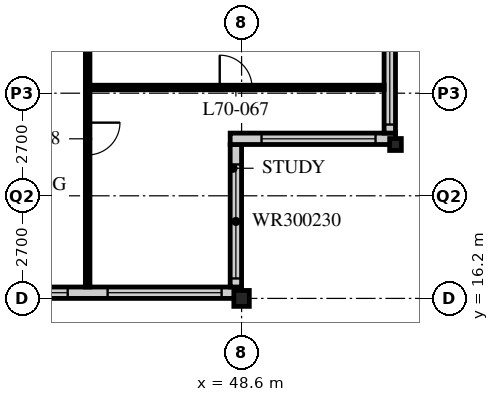
"""IFC4 building model, lengths in metres.
Left out: names, types, materials, properties, quantities, classifications, styles, units other than length and angle.
Written with IfcOpenShell. Run it as: python <this file> out.ifc"""

import sys

from ifc_helpers import new_model, si_unit, direction, frame, frame_2d, origin, origin_2d, place, context, subcontext, project, spatial, rectangle, i_section, extrude, element, fill, save


model = new_model("IFC4")
c1 = context("Model", 3, precision=1e-05, world=origin(), true_north=direction((0.0, 1.0)))
c2 = subcontext(c1, "Body", "Model", "MODEL_VIEW")
j1 = project(units=[si_unit("LENGTHUNIT", "METRE"), si_unit("PLANEANGLEUNIT", "RADIAN")], contexts=[c1])
p1 = place(None, origin())
s1 = spatial("IfcSite", under=j1, at=p1, CompositionType="ELEMENT")
p2 = place(p1, origin())
s2 = spatial("IfcBuilding", under=s1, at=p2, CompositionType="ELEMENT")
p3 = place(p2, frame((0.0, 0.0, 273.6)))
s3 = spatial("IfcBuildingStorey", under=s2, at=p3, CompositionType="ELEMENT", Elevation=273.6)
p4 = place(p3, frame((48.6, 16.2, 0.0), z_axis=(0.0, 0.0, 1.0), x_axis=(1.0, 0.0, 0.0)))
e1 = element("IfcColumn", 1, at=p4, inside=s3, PredefinedType="COLUMN", context=c2, shape_type="SweptSolid", body=[
    extrude(i_section(OverallWidth=0.407, OverallDepth=0.419, WebThickness=0.031, FlangeThickness=0.049, FilletRadius=0.015, at=origin_2d()), origin(), (0.0, 0.0, 1.0), 3.9),
])
p5 = place(p3, frame((52.65, 20.25, 0.0), z_axis=(0.0, 0.0, 1.0), x_axis=(1.0, 0.0, 0.0)))
e2 = element("IfcColumn", 2, at=p5, inside=s3, PredefinedType="COLUMN", context=c2, shape_type="SweptSolid", body=[
    extrude(i_section(OverallWidth=0.307, OverallDepth=0.314, WebThickness=0.012, FlangeThickness=0.019, FilletRadius=0.015, at=origin_2d()), origin(), (0.0, 0.0, 1.0), 3.9),
])
p6 = place(p3, frame((8.4, 16.35, 0.0), z_axis=(0.0, 0.0, 1.0), x_axis=(1.0, 0.0, 0.0)))
e3 = element("IfcWall", 3, at=p6, inside=s3, PredefinedType="SOLIDWALL", context=c2, shape_type="SweptSolid", body=[
    extrude(rectangle(XDim=40.2, YDim=0.3, at=frame_2d((20.1, 0.0))), origin(), (0.0, 0.0, 1.0), 3.69),
])
p7 = place(p6, frame((0.225, 0.0, 0.6)))
e4 = element("IfcOpeningElement", 4, at=p7, cuts=e3, PredefinedType="OPENING", context=c2, shape_type="SweptSolid", body=[
    extrude(rectangle(XDim=3.0, YDim=2.4, at=frame_2d((1.5, 1.2))), frame((0.0, 0.16, 0.0), z_axis=(0.0, -1.0, 0.0), x_axis=(1.0, 0.0, 0.0)), (0.0, 0.0, 1.0), 0.32),
])
p8 = place(p6, frame((4.275, 0.0, 0.6)))
e5 = element("IfcOpeningElement", 5, at=p8, cuts=e3, PredefinedType="OPENING", context=c2, shape_type="SweptSolid", body=[
    extrude(rectangle(XDim=3.0, YDim=2.4, at=frame_2d((1.5, 1.2))), frame((0.0, 0.16, 0.0), z_axis=(0.0, -1.0, 0.0), x_axis=(1.0, 0.0, 0.0)), (0.0, 0.0, 1.0), 0.32),
])
p9 = place(p6, frame((8.325, 0.0, 0.6)))
e6 = element("IfcOpeningElement", 6, at=p9, cuts=e3, PredefinedType="OPENING", context=c2, shape_type="SweptSolid", body=[
    extrude(rectangle(XDim=3.0, YDim=2.4, at=frame_2d((1.5, 1.2))), frame((0.0, 0.16, 0.0), z_axis=(0.0, -1.0, 0.0), x_axis=(1.0, 0.0, 0.0)), (0.0, 0.0, 1.0), 0.32),
])
p10 = place(p6, frame((12.375, 0.0, 0.6)))
e7 = element("IfcOpeningElement", 7, at=p10, cuts=e3, PredefinedType="OPENING", context=c2, shape_type="SweptSolid", body=[
    extrude(rectangle(XDim=3.0, YDim=2.4, at=frame_2d((1.5, 1.2))), frame((0.0, 0.16, 0.0), z_axis=(0.0, -1.0, 0.0), x_axis=(1.0, 0.0, 0.0)), (0.0, 0.0, 1.0), 0.32),
])
p11 = place(p6, frame((16.425, 0.0, 0.6)))
e8 = element("IfcOpeningElement", 8, at=p11, cuts=e3, PredefinedType="OPENING", context=c2, shape_type="SweptSolid", body=[
    extrude(rectangle(XDim=3.0, YDim=2.4, at=frame_2d((1.5, 1.2))), frame((0.0, 0.16, 0.0), z_axis=(0.0, -1.0, 0.0), x_axis=(1.0, 0.0, 0.0)), (0.0, 0.0, 1.0), 0.32),
])
p12 = place(p6, frame((20.475, 0.0, 0.6)))
e9 = element("IfcOpeningElement", 9, at=p12, cuts=e3, PredefinedType="OPENING", context=c2, shape_type="SweptSolid", body=[
    extrude(rectangle(XDim=3.0, YDim=2.4, at=frame_2d((1.5, 1.2))), frame((0.0, 0.16, 0.0), z_axis=(0.0, -1.0, 0.0), x_axis=(1.0, 0.0, 0.0)), (0.0, 0.0, 1.0), 0.32),
])
p13 = place(p6, frame((24.525, 0.0, 0.6)))
e10 = element("IfcOpeningElement", 10, at=p13, cuts=e3, PredefinedType="OPENING", context=c2, shape_type="SweptSolid", body=[
    extrude(rectangle(XDim=3.0, YDim=2.4, at=frame_2d((1.5, 1.2))), frame((0.0, 0.16, 0.0), z_axis=(0.0, -1.0, 0.0), x_axis=(1.0, 0.0, 0.0)), (0.0, 0.0, 1.0), 0.32),
])
p14 = place(p6, frame((28.575, 0.0, 0.6)))
e11 = element("IfcOpeningElement", 11, at=p14, cuts=e3, PredefinedType="OPENING", context=c2, shape_type="SweptSolid", body=[
    extrude(rectangle(XDim=3.0, YDim=2.4, at=frame_2d((1.5, 1.2))), frame((0.0, 0.16, 0.0), z_axis=(0.0, -1.0, 0.0), x_axis=(1.0, 0.0, 0.0)), (0.0, 0.0, 1.0), 0.32),
])
p15 = place(p6, frame((32.625, 0.0, 0.6)))
e12 = element("IfcOpeningElement", 12, at=p15, cuts=e3, PredefinedType="OPENING", context=c2, shape_type="SweptSolid", body=[
    extrude(rectangle(XDim=3.0, YDim=2.4, at=frame_2d((1.5, 1.2))), frame((0.0, 0.16, 0.0), z_axis=(0.0, -1.0, 0.0), x_axis=(1.0, 0.0, 0.0)), (0.0, 0.0, 1.0), 0.32),
])
p16 = place(p6, frame((36.675, 0.0, 0.6)))
e13 = element("IfcOpeningElement", 13, at=p16, cuts=e3, PredefinedType="OPENING", context=c2, shape_type="SweptSolid", body=[
    extrude(rectangle(XDim=3.0, YDim=2.4, at=frame_2d((1.5, 1.2))), frame((0.0, 0.16, 0.0), z_axis=(0.0, -1.0, 0.0), x_axis=(1.0, 0.0, 0.0)), (0.0, 0.0, 1.0), 0.32),
])
p17 = place(p3, frame((48.45, 16.5, 0.0), z_axis=(0.0, 0.0, 1.0), x_axis=(0.0, 1.0, 0.0)))
e14 = element("IfcWall", 14, at=p17, inside=s3, PredefinedType="SOLIDWALL", context=c2, shape_type="SweptSolid", body=[
    extrude(rectangle(XDim=3.75, YDim=0.3, at=frame_2d((1.875, 0.0))), origin(), (0.0, 0.0, 1.0), 3.69),
])
p18 = place(p17, frame((0.225, 0.0, 0.6)))
e15 = element("IfcOpeningElement", 15, at=p18, cuts=e14, PredefinedType="OPENING", context=c2, shape_type="SweptSolid", body=[
    extrude(rectangle(XDim=3.0, YDim=2.3, at=frame_2d((1.5, 1.15))), frame((0.0, 0.16, 0.0), z_axis=(0.0, -1.0, 0.0), x_axis=(1.0, 0.0, 0.0)), (0.0, 0.0, 1.0), 0.32),
])
p19 = place(p3, frame((48.3, 20.4, 0.0), z_axis=(0.0, 0.0, 1.0), x_axis=(1.0, 0.0, 0.0)))
e16 = element("IfcWall", 16, at=p19, inside=s3, PredefinedType="SOLIDWALL", context=c2, shape_type="SweptSolid", body=[
    extrude(rectangle(XDim=4.35, YDim=0.3, at=frame_2d((2.175, 0.0))), origin(), (0.0, 0.0, 1.0), 3.69),
])
p20 = place(p19, frame((0.825, 0.0, 0.6)))
e17 = element("IfcOpeningElement", 17, at=p20, cuts=e16, PredefinedType="OPENING", context=c2, shape_type="SweptSolid", body=[
    extrude(rectangle(XDim=3.0, YDim=2.3, at=frame_2d((1.5, 1.15))), frame((0.0, 0.16, 0.0), z_axis=(0.0, -1.0, 0.0), x_axis=(1.0, 0.0, 0.0)), (0.0, 0.0, 1.0), 0.32),
])
p21 = place(p3, frame((52.5, 20.55, 0.0), z_axis=(0.0, 0.0, 1.0), x_axis=(0.0, 1.0, 0.0)))
e18 = element("IfcWall", 18, at=p21, inside=s3, PredefinedType="SOLIDWALL", context=c2, shape_type="SweptSolid", body=[
    extrude(rectangle(XDim=3.75, YDim=0.3, at=frame_2d((1.875, 0.0))), origin(), (0.0, 0.0, 1.0), 3.69),
])
p22 = place(p21, frame((0.225, 0.0, 0.6)))
e19 = element("IfcOpeningElement", 19, at=p22, cuts=e18, PredefinedType="OPENING", context=c2, shape_type="SweptSolid", body=[
    extrude(rectangle(XDim=3.0, YDim=2.3, at=frame_2d((1.5, 1.15))), frame((0.0, 0.16, 0.0), z_axis=(0.0, -1.0, 0.0), x_axis=(1.0, 0.0, 0.0)), (0.0, 0.0, 1.0), 0.32),
])
p23 = place(p3, frame((44.55, 16.5, 0.0), z_axis=(0.0, 0.0, 1.0), x_axis=(0.0, 1.0, 0.0)))
e20 = element("IfcWall", 20, at=p23, inside=s3, PredefinedType="PARTITIONING", context=c2, shape_type="SweptSolid", body=[
    extrude(rectangle(XDim=7.8, YDim=0.12, at=frame_2d((3.9, 0.0))), origin(), (0.0, 0.0, 1.0), 3.69),
])
p24 = place(p23, frame((3.475, 0.0, 0.0)))
e21 = element("IfcOpeningElement", 21, at=p24, cuts=e20, PredefinedType="OPENING", context=c2, shape_type="SweptSolid", body=[
    extrude(rectangle(XDim=0.85, YDim=2.1, at=frame_2d((0.425, 1.05))), frame((0.0, 0.07, 0.0), z_axis=(0.0, -1.0, 0.0), x_axis=(1.0, 0.0, 0.0)), (0.0, 0.0, 1.0), 0.14),
])
p25 = place(p3, frame((44.55, 21.75, 0.0), z_axis=(0.0, 0.0, 1.0), x_axis=(1.0, 0.0, 0.0)))
e22 = element("IfcWall", 22, at=p25, inside=s3, PredefinedType="PARTITIONING", context=c2, shape_type="SweptSolid", body=[
    extrude(rectangle(XDim=7.8, YDim=0.12, at=frame_2d((3.9, 0.0))), origin(), (0.0, 0.0, 1.0), 3.69),
])
p26 = place(p25, frame((3.475, 0.0, 0.0)))
e23 = element("IfcOpeningElement", 23, at=p26, cuts=e22, PredefinedType="OPENING", context=c2, shape_type="SweptSolid", body=[
    extrude(rectangle(XDim=0.85, YDim=2.1, at=frame_2d((0.425, 1.05))), frame((0.0, 0.07, 0.0), z_axis=(0.0, -1.0, 0.0), x_axis=(1.0, 0.0, 0.0)), (0.0, 0.0, 1.0), 0.14),
])
p27 = place(p15, origin())
e24 = element("IfcWindow", 24, at=p27, inside=s3, PartitioningType="SINGLE_PANEL", PredefinedType="WINDOW", context=c2, shape_type="SweptSolid", body=[
    extrude(rectangle(XDim=3.0, YDim=2.4, at=frame_2d((1.5, 1.2))), frame((0.0, 0.03, 0.0), z_axis=(0.0, -1.0, 0.0), x_axis=(1.0, 0.0, 0.0)), (0.0, 0.0, 1.0), 0.06),
])
fill(e12, e24)
p28 = place(p16, origin())
e25 = element("IfcWindow", 25, at=p28, inside=s3, PartitioningType="SINGLE_PANEL", PredefinedType="WINDOW", context=c2, shape_type="SweptSolid", body=[
    extrude(rectangle(XDim=3.0, YDim=2.4, at=frame_2d((1.5, 1.2))), frame((0.0, 0.03, 0.0), z_axis=(0.0, -1.0, 0.0), x_axis=(1.0, 0.0, 0.0)), (0.0, 0.0, 1.0), 0.06),
])
fill(e13, e25)
p29 = place(p18, origin())
e26 = element("IfcWindow", 26, at=p29, inside=s3, PartitioningType="SINGLE_PANEL", PredefinedType="WINDOW", context=c2, shape_type="SweptSolid", body=[
    extrude(rectangle(XDim=3.0, YDim=2.3, at=frame_2d((1.5, 1.15))), frame((0.0, 0.03, 0.0), z_axis=(0.0, -1.0, 0.0), x_axis=(1.0, 0.0, 0.0)), (0.0, 0.0, 1.0), 0.06),
])
fill(e15, e26)
p30 = place(p20, origin())
e27 = element("IfcWindow", 27, at=p30, inside=s3, PartitioningType="SINGLE_PANEL", PredefinedType="WINDOW", context=c2, shape_type="SweptSolid", body=[
    extrude(rectangle(XDim=3.0, YDim=2.3, at=frame_2d((1.5, 1.15))), frame((0.0, 0.03, 0.0), z_axis=(0.0, -1.0, 0.0), x_axis=(1.0, 0.0, 0.0)), (0.0, 0.0, 1.0), 0.06),
])
fill(e17, e27)
p31 = place(p22, origin())
e28 = element("IfcWindow", 28, at=p31, inside=s3, PartitioningType="SINGLE_PANEL", PredefinedType="WINDOW", context=c2, shape_type="SweptSolid", body=[
    extrude(rectangle(XDim=3.0, YDim=2.3, at=frame_2d((1.5, 1.15))), frame((0.0, 0.03, 0.0), z_axis=(0.0, -1.0, 0.0), x_axis=(1.0, 0.0, 0.0)), (0.0, 0.0, 1.0), 0.06),
])
fill(e19, e28)
p32 = place(p24, origin())
e29 = element("IfcDoor", 29, at=p32, inside=s3, OperationType="SINGLE_SWING_LEFT", PredefinedType="DOOR", context=c2, shape_type="SweptSolid", body=[
    extrude(rectangle(XDim=0.85, YDim=2.1, at=frame_2d((0.425, 1.05))), frame((0.0, 0.025, 0.0), z_axis=(0.0, -1.0, 0.0), x_axis=(1.0, 0.0, 0.0)), (0.0, 0.0, 1.0), 0.05),
])
fill(e21, e29)
p33 = place(p26, origin())
e30 = element("IfcDoor", 30, at=p33, inside=s3, OperationType="SINGLE_SWING_LEFT", PredefinedType="DOOR", context=c2, shape_type="SweptSolid", body=[
    extrude(rectangle(XDim=0.85, YDim=2.1, at=frame_2d((0.425, 1.05))), frame((0.0, 0.025, 0.0), z_axis=(0.0, -1.0, 0.0), x_axis=(1.0, 0.0, 0.0)), (0.0, 0.0, 1.0), 0.05),
])
fill(e23, e30)
save(model, sys.argv[1])
